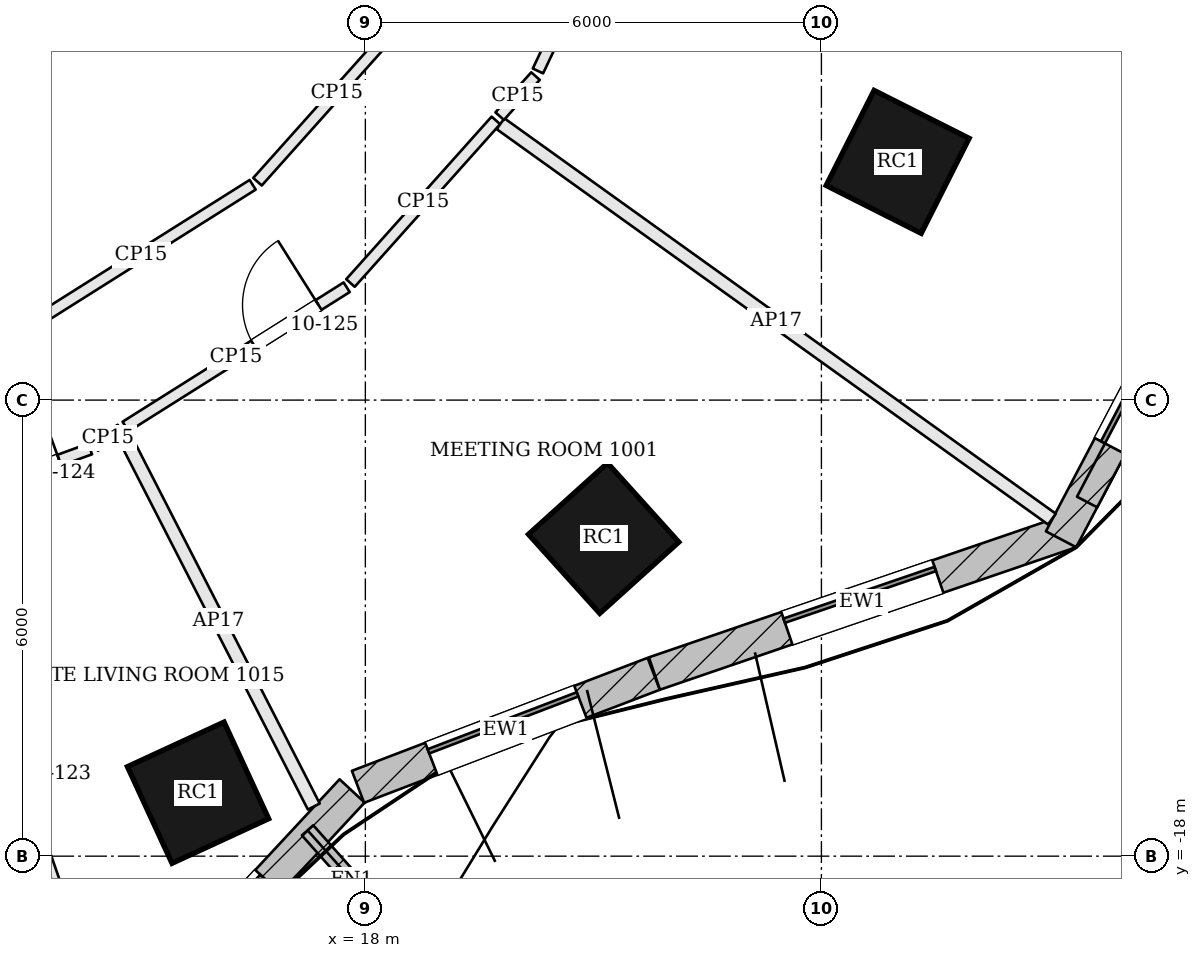
"""IFC4 building model, lengths in metres.
Left out: names, types, materials, properties, quantities, classifications, styles, units other than length and angle.
Written with IfcOpenShell. Run it as: python <this file> out.ifc"""

import sys

from ifc_helpers import new_model, si_unit, direction, frame, frame_2d, origin, origin_2d, place, context, subcontext, project, spatial, rectangle, extrude, element, fill, save


model = new_model("IFC4")
c1 = context("Model", 3, precision=1e-05, world=origin(), true_north=direction((0.0, 1.0)))
c2 = subcontext(c1, "Body", "Model", "MODEL_VIEW")
j1 = project(units=[si_unit("LENGTHUNIT", "METRE"), si_unit("PLANEANGLEUNIT", "RADIAN")], contexts=[c1])
p1 = place(None, origin())
s1 = spatial("IfcSite", under=j1, at=p1, CompositionType="ELEMENT")
p2 = place(p1, origin())
s2 = spatial("IfcBuilding", under=s1, at=p2, CompositionType="ELEMENT")
p3 = place(p2, frame((0.0, 0.0, 51.9)))
s3 = spatial("IfcBuildingStorey", under=s2, at=p3, CompositionType="ELEMENT", Elevation=51.9)
for number, where, z_axis, x_axis in (
    (1, (15.799, -17.165, 0.0), (0.0, 0.0, 1.0), (0.908, 0.419, 0.0)),
    (2, (21.135, -13.817, 0.0), (0.0, 0.0, 1.0), (0.743, 0.67, 0.0)),
    (3, (25.003, -8.866, 0.0), (0.0, 0.0, 1.0), (0.45, 0.893, 0.0)),
):
    element("IfcColumn", number, at=place(p3, frame(where, z_axis=z_axis, x_axis=x_axis)), inside=s3, PredefinedType="COLUMN", context=c2, shape_type="SweptSolid", body=[
        extrude(rectangle(XDim=1.4, YDim=1.4, at=origin_2d()), origin(), (0.0, 0.0, 1.0), 3.6),
    ])
p4 = place(p3, frame((14.177, -21.066, 0.0), z_axis=(0.0, 0.0, 1.0), x_axis=(0.680847709714, 0.732425010617, 0.0)))
e4 = element("IfcWall", 4, at=p4, inside=s3, PredefinedType="SOLIDWALL", context=c2, shape_type="SweptSolid", body=[
    extrude(rectangle(XDim=5.358, YDim=0.45, at=frame_2d((2.679, 0.0))), origin(), (0.0, 0.0, 1.0), 3.4),
])
p5 = place(p4, frame((1.629, 0.0, 0.9)))
e5 = element("IfcOpeningElement", 5, at=p5, cuts=e4, PredefinedType="OPENING", context=c2, shape_type="SweptSolid", body=[
    extrude(rectangle(XDim=2.1, YDim=2.0, at=frame_2d((1.05, 1.0))), frame((0.0, 0.235, 0.0), z_axis=(0.0, -1.0, 0.0), x_axis=(1.0, 0.0, 0.0)), (0.0, 0.0, 1.0), 0.47),
])
p6 = place(p3, frame((17.903, -17.087, 0.0), z_axis=(0.0, 0.0, 1.0), x_axis=(0.934145554025, 0.356892258105, 0.0)))
e6 = element("IfcWall", 6, at=p6, inside=s3, PredefinedType="SOLIDWALL", context=c2, shape_type="SweptSolid", body=[
    extrude(rectangle(XDim=4.165, YDim=0.45, at=frame_2d((2.082, 0.0))), origin(), (0.0, 0.0, 1.0), 3.4),
])
p7 = place(p6, frame((1.032, 0.0, 0.9)))
e7 = element("IfcOpeningElement", 7, at=p7, cuts=e6, PredefinedType="OPENING", context=c2, shape_type="SweptSolid", body=[
    extrude(rectangle(XDim=2.1, YDim=2.0, at=frame_2d((1.05, 1.0))), frame((0.0, 0.235, 0.0), z_axis=(0.0, -1.0, 0.0), x_axis=(1.0, 0.0, 0.0)), (0.0, 0.0, 1.0), 0.47),
])
p8 = place(p3, frame((21.803, -15.597, 0.0), z_axis=(0.0, 0.0, 1.0), x_axis=(0.946115314877, 0.323829910532, 0.0)))
e8 = element("IfcWall", 8, at=p8, inside=s3, PredefinedType="SOLIDWALL", context=c2, shape_type="SweptSolid", body=[
    extrude(rectangle(XDim=5.782, YDim=0.45, at=frame_2d((2.891, 0.0))), origin(), (0.0, 0.0, 1.0), 3.4),
])
p9 = place(p8, frame((1.841, 0.0, 0.9)))
e9 = element("IfcOpeningElement", 9, at=p9, cuts=e8, PredefinedType="OPENING", context=c2, shape_type="SweptSolid", body=[
    extrude(rectangle(XDim=2.1, YDim=2.0, at=frame_2d((1.05, 1.0))), frame((0.0, 0.235, 0.0), z_axis=(0.0, -1.0, 0.0), x_axis=(1.0, 0.0, 0.0)), (0.0, 0.0, 1.0), 0.47),
])
p10 = place(p3, frame((27.153, -13.831, 0.0), z_axis=(0.0, 0.0, 1.0), x_axis=(0.465165872942, 0.885223537108, 0.0)))
e10 = element("IfcWall", 10, at=p10, inside=s3, PredefinedType="SOLIDWALL", context=c2, shape_type="SweptSolid", body=[
    extrude(rectangle(XDim=4.871, YDim=0.45, at=frame_2d((2.436, 0.0))), origin(), (0.0, 0.0, 1.0), 3.4),
])
p11 = place(p10, frame((1.385, 0.0, 0.9)))
e11 = element("IfcOpeningElement", 11, at=p11, cuts=e10, PredefinedType="OPENING", context=c2, shape_type="SweptSolid", body=[
    extrude(rectangle(XDim=2.1, YDim=2.0, at=frame_2d((1.05, 1.0))), frame((0.0, 0.235, 0.0), z_axis=(0.0, -1.0, 0.0), x_axis=(1.0, 0.0, 0.0)), (0.0, 0.0, 1.0), 0.47),
])
p12 = place(p3, frame((17.24, -17.66, 0.0), z_axis=(0.0, 0.0, 1.0), x_axis=(0.664017424016, -0.747717099312, 0.0)))
e12 = element("IfcWall", 12, at=p12, inside=s3, PredefinedType="SOLIDWALL", context=c2, shape_type="SweptSolid", body=[
    extrude(rectangle(XDim=1.75, YDim=0.2, at=frame_2d((0.875, 0.0))), origin(), (0.0, 0.0, 1.0), 3.4),
])
p13 = place(p3, frame((27.495, -13.341, 3.6), z_axis=(0.0, 0.0, 1.0), x_axis=(0.46519687666, 0.88520724463, 0.0)))
e13 = element("IfcWall", 13, at=p13, inside=s3, PredefinedType="PARAPET", context=c2, shape_type="SweptSolid", body=[
    extrude(rectangle(XDim=4.139, YDim=0.3, at=frame_2d((2.069, 0.0))), origin(), (0.0, 0.0, 1.0), 1.1),
])
p14 = place(p3, frame((10.543, -14.04, 0.0), z_axis=(0.0, 0.0, 1.0), x_axis=(0.939576705301, 0.342338450741, 0.0)))
e14 = element("IfcWall", 14, at=p14, inside=s3, PredefinedType="PARTITIONING", context=c2, shape_type="SweptSolid", body=[
    extrude(rectangle(XDim=4.082, YDim=0.15, at=frame_2d((2.041, 0.0))), origin(), (0.0, 0.0, 1.0), 2.68),
])
p15 = place(p14, frame((2.65, 0.0, 0.0)))
e15 = element("IfcOpeningElement", 15, at=p15, cuts=e14, PredefinedType="OPENING", context=c2, shape_type="SweptSolid", body=[
    extrude(rectangle(XDim=1.0, YDim=2.1, at=frame_2d((0.5, 1.05))), frame((0.0, 0.085, 0.0), z_axis=(0.0, -1.0, 0.0), x_axis=(1.0, 0.0, 0.0)), (0.0, 0.0, 1.0), 0.17),
])
p16 = place(p3, frame((14.442, -12.603, 0.0), z_axis=(0.0, 0.0, 1.0), x_axis=(0.845806400094, 0.533489956381, 0.0)))
e16 = element("IfcWall", 16, at=p16, inside=s3, PredefinedType="PARTITIONING", context=c2, shape_type="SweptSolid", body=[
    extrude(rectangle(XDim=0.402, YDim=0.15, at=frame_2d((0.201, 0.0))), origin(), (0.0, 0.0, 1.0), 2.68),
])
p17 = place(p3, frame((17.322, -17.347, 0.0), z_axis=(0.0, 0.0, 1.0), x_axis=(-0.455844974843, 0.890059188431, 0.0)))
e17 = element("IfcWall", 17, at=p17, inside=s3, PredefinedType="PARTITIONING", context=c2, shape_type="SweptSolid", body=[
    extrude(rectangle(XDim=5.497, YDim=0.175, at=frame_2d((2.748, 0.0))), origin(), (0.0, 0.0, 1.0), 2.68),
])
p18 = place(p3, frame((14.846, -12.348, 0.0), z_axis=(0.0, 0.0, 1.0), x_axis=(0.846001508251, 0.533180502304, 0.0)))
e18 = element("IfcWall", 18, at=p18, inside=s3, PredefinedType="PARTITIONING", context=c2, shape_type="SweptSolid", body=[
    extrude(rectangle(XDim=3.438, YDim=0.15, at=frame_2d((1.719, 0.0))), origin(), (0.0, 0.0, 1.0), 2.68),
])
p19 = place(p18, frame((2.0, 0.0, 0.0)))
e19 = element("IfcOpeningElement", 19, at=p19, cuts=e18, PredefinedType="OPENING", context=c2, shape_type="SweptSolid", body=[
    extrude(rectangle(XDim=1.0, YDim=2.4, at=frame_2d((0.5, 1.2))), frame((0.0, 0.085, 0.0), z_axis=(0.0, -1.0, 0.0), x_axis=(1.0, 0.0, 0.0)), (0.0, 0.0, 1.0), 0.17),
])
p20 = place(p3, frame((17.804, -10.46, 0.0), z_axis=(0.0, 0.0, 1.0), x_axis=(0.666578501565, 0.745434840379, 0.0)))
e20 = element("IfcWall", 20, at=p20, inside=s3, PredefinedType="PARTITIONING", context=c2, shape_type="SweptSolid", body=[
    extrude(rectangle(XDim=2.87, YDim=0.15, at=frame_2d((1.435, 0.0))), origin(), (0.0, 0.0, 1.0), 2.68),
])
p21 = place(p3, frame((27.033, -13.565, 0.0), z_axis=(0.0, 0.0, 1.0), x_axis=(-0.812688040514, 0.58269902077, 0.0)))
e21 = element("IfcWall", 21, at=p21, inside=s3, PredefinedType="PARTITIONING", context=c2, shape_type="SweptSolid", body=[
    extrude(rectangle(XDim=8.927, YDim=0.175, at=frame_2d((4.463, 0.0))), origin(), (0.0, 0.0, 1.0), 2.68),
])
p22 = place(p3, frame((19.767, -8.264, 0.0), z_axis=(0.0, 0.0, 1.0), x_axis=(0.666633300143, 0.745385835082, 0.0)))
e22 = element("IfcWall", 22, at=p22, inside=s3, PredefinedType="PARTITIONING", context=c2, shape_type="SweptSolid", body=[
    extrude(rectangle(XDim=0.707, YDim=0.15, at=frame_2d((0.354, 0.0))), origin(), (0.0, 0.0, 1.0), 2.68),
])
p23 = place(p3, frame((20.271, -7.67, 0.0), z_axis=(0.0, 0.0, 1.0), x_axis=(0.427995478521, 0.903780875193, 0.0)))
e23 = element("IfcWall", 23, at=p23, inside=s3, PredefinedType="PARTITIONING", context=c2, shape_type="SweptSolid", body=[
    extrude(rectangle(XDim=2.656, YDim=0.15, at=frame_2d((1.328, 0.0))), origin(), (0.0, 0.0, 1.0), 2.68),
])
p24 = place(p3, frame((18.673, -6.788, 0.0), z_axis=(0.0, 0.0, 1.0), x_axis=(-0.666610670036, -0.745406073623, 0.0)))
e24 = element("IfcWall", 24, at=p24, inside=s3, PredefinedType="PARTITIONING", context=c2, shape_type="SweptSolid", body=[
    extrude(rectangle(XDim=3.139, YDim=0.15, at=frame_2d((1.569, 0.0))), origin(), (0.0, 0.0, 1.0), 2.68),
])
p25 = place(p3, frame((16.517, -9.167, 0.0), z_axis=(0.0, 0.0, 1.0), x_axis=(-0.846000117603, -0.533182708849, 0.0)))
e25 = element("IfcWall", 25, at=p25, inside=s3, PredefinedType="PARTITIONING", context=c2, shape_type="SweptSolid", body=[
    extrude(rectangle(XDim=3.47, YDim=0.15, at=frame_2d((1.735, 0.0))), origin(), (0.0, 0.0, 1.0), 2.68),
])
p26 = place(p3, frame((14.603, -20.272, 0.0), z_axis=(0.0, 0.0, 1.0), x_axis=(-0.327236845349, 0.944942351176, 0.0)))
e26 = element("IfcWall", 26, at=p26, inside=s3, PredefinedType="PARTITIONING", context=c2, shape_type="SweptSolid", body=[
    extrude(rectangle(XDim=7.171, YDim=0.1, at=frame_2d((3.585, 0.0))), origin(), (0.0, 0.0, 1.0), 2.898),
])
p27 = place(p26, frame((3.096, 0.0, 0.0)))
e27 = element("IfcOpeningElement", 27, at=p27, cuts=e26, PredefinedType="OPENING", context=c2, shape_type="SweptSolid", body=[
    extrude(rectangle(XDim=0.9, YDim=2.4, at=frame_2d((0.45, 1.2))), frame((0.0, 0.06, 0.0), z_axis=(0.0, -1.0, 0.0), x_axis=(1.0, 0.0, 0.0)), (0.0, 0.0, 1.0), 0.12),
])
p28 = place(p5, origin())
e28 = element("IfcWindow", 28, at=p28, inside=s3, PartitioningType="SINGLE_PANEL", PredefinedType="WINDOW", context=c2, shape_type="SweptSolid", body=[
    extrude(rectangle(XDim=2.1, YDim=2.0, at=frame_2d((1.05, 1.0))), frame((0.0, 0.135, 0.0), z_axis=(0.0, -1.0, 0.0), x_axis=(1.0, 0.0, 0.0)), (0.0, 0.0, 1.0), 0.06),
])
fill(e5, e28)
p29 = place(p7, origin())
e29 = element("IfcWindow", 29, at=p29, inside=s3, PartitioningType="SINGLE_PANEL", PredefinedType="WINDOW", context=c2, shape_type="SweptSolid", body=[
    extrude(rectangle(XDim=2.1, YDim=2.0, at=frame_2d((1.05, 1.0))), frame((0.0, 0.135, 0.0), z_axis=(0.0, -1.0, 0.0), x_axis=(1.0, 0.0, 0.0)), (0.0, 0.0, 1.0), 0.06),
])
fill(e7, e29)
p30 = place(p9, origin())
e30 = element("IfcWindow", 30, at=p30, inside=s3, PartitioningType="SINGLE_PANEL", PredefinedType="WINDOW", context=c2, shape_type="SweptSolid", body=[
    extrude(rectangle(XDim=2.1, YDim=2.0, at=frame_2d((1.05, 1.0))), frame((0.0, 0.135, 0.0), z_axis=(0.0, -1.0, 0.0), x_axis=(1.0, 0.0, 0.0)), (0.0, 0.0, 1.0), 0.06),
])
fill(e9, e30)
p31 = place(p11, origin())
e31 = element("IfcWindow", 31, at=p31, inside=s3, PartitioningType="SINGLE_PANEL", PredefinedType="WINDOW", context=c2, shape_type="SweptSolid", body=[
    extrude(rectangle(XDim=2.1, YDim=2.0, at=frame_2d((1.05, 1.0))), frame((0.0, 0.135, 0.0), z_axis=(0.0, -1.0, 0.0), x_axis=(1.0, 0.0, 0.0)), (0.0, 0.0, 1.0), 0.06),
])
fill(e11, e31)
p32 = place(p15, origin())
e32 = element("IfcDoor", 32, at=p32, inside=s3, OperationType="SINGLE_SWING_RIGHT", PredefinedType="DOOR", context=c2, shape_type="SweptSolid", body=[
    extrude(rectangle(XDim=1.0, YDim=2.1, at=frame_2d((0.5, 1.05))), frame((0.0, 0.025, 0.0), z_axis=(0.0, -1.0, 0.0), x_axis=(1.0, 0.0, 0.0)), (0.0, 0.0, 1.0), 0.05),
])
fill(e15, e32)
p33 = place(p19, origin())
e33 = element("IfcDoor", 33, at=p33, inside=s3, OperationType="SINGLE_SWING_RIGHT", PredefinedType="DOOR", context=c2, shape_type="SweptSolid", body=[
    extrude(rectangle(XDim=1.0, YDim=2.4, at=frame_2d((0.5, 1.2))), frame((0.0, 0.025, 0.0), z_axis=(0.0, -1.0, 0.0), x_axis=(1.0, 0.0, 0.0)), (0.0, 0.0, 1.0), 0.05),
])
fill(e19, e33)
save(model, sys.argv[1])
